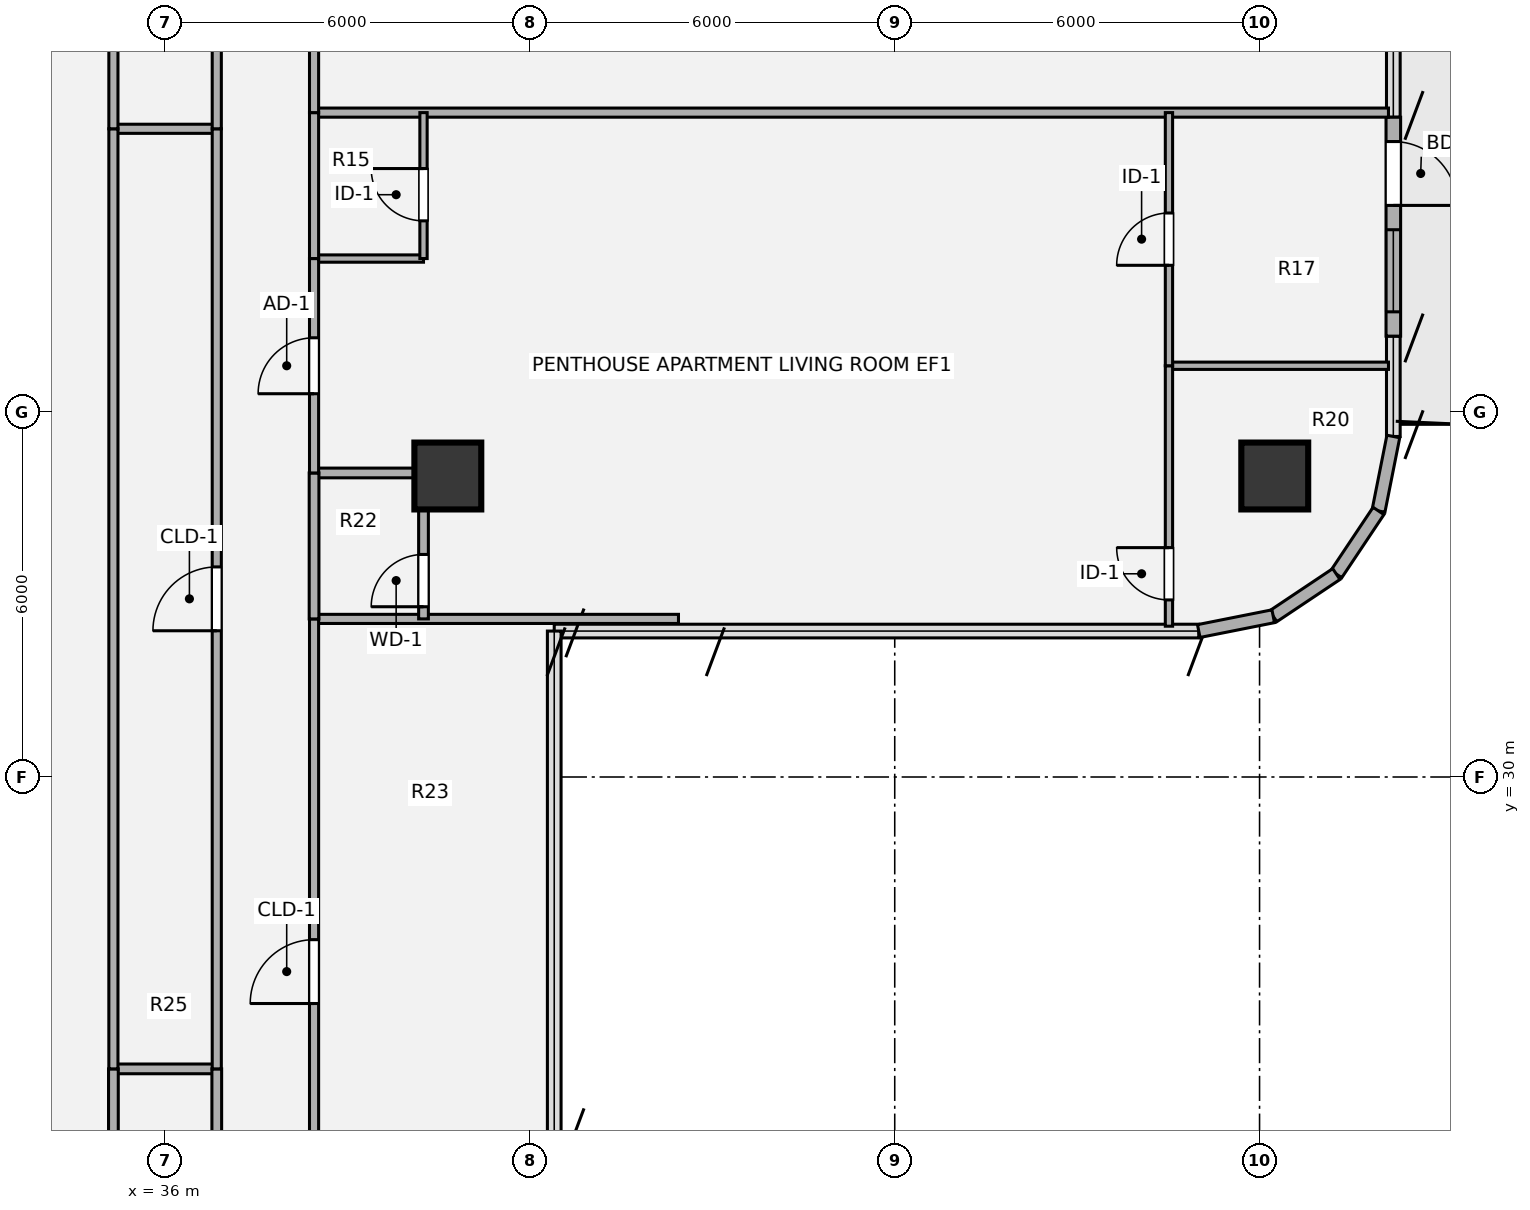
"""IFC4 building model, lengths in metres.
Left out: names, types, materials, properties, quantities, classifications, styles, units other than length and angle.
Written with IfcOpenShell. Run it as: python <this file> out.ifc"""

import sys

from ifc_helpers import new_model, si_unit, direction, frame, frame_2d, origin, origin_2d, place, context, subcontext, project, spatial, rectangle, hollow_circle, extrude, source, transform, mapped, element, fill, save


model = new_model("IFC4")
c1 = context("Model", 3, precision=1e-05, world=origin(), true_north=direction((0.0, 1.0)))
c2 = subcontext(c1, "Body", "Model", "MODEL_VIEW")
j1 = project(units=[si_unit("LENGTHUNIT", "METRE"), si_unit("PLANEANGLEUNIT", "RADIAN")], contexts=[c1])
p1 = place(None, origin())
s1 = spatial("IfcSite", under=j1, at=p1, CompositionType="ELEMENT")
p2 = place(p1, origin())
s2 = spatial("IfcBuilding", under=s1, at=p2, CompositionType="ELEMENT")
p3 = place(p2, frame((0.0, 0.0, 205.56)))
s3 = spatial("IfcBuildingStorey", under=s2, at=p3, CompositionType="ELEMENT", Elevation=205.56)
m1 = source(origin(), c2, "Body", "SweptSolid", [
    extrude(hollow_circle(Radius=0.55, WallThickness=0.04, at=origin_2d()), origin(), (0.0, 0.0, 1.0), 3.78),
])
for number, where, z_axis, x_axis in (
    (1, (54.25, 34.95, 0.0), (0.0, 0.0, 1.0), (1.0, 0.0, 0.0)),
    (2, (40.65, 34.95, 0.0), (0.0, 0.0, 1.0), (1.0, 0.0, 0.0)),
):
    element("IfcColumn", number, at=place(p3, frame(where, z_axis=z_axis, x_axis=x_axis)), inside=s3, PredefinedType="COLUMN", context=c2, shape_type="MappedRepresentation", body=[
        mapped(m1, transform((0.0, 0.0, 0.0), x_axis=(1.0, 0.0, 0.0), y_axis=(0.0, 1.0, 0.0), z_axis=(0.0, 0.0, 1.0), scale=1.0)),
    ])
p4 = place(p3, frame((56.2, 40.85, 0.0), z_axis=(0.0, 0.0, 1.0), x_axis=(0.0, -1.0, 0.0)))
e3 = element("IfcWall", 3, at=p4, inside=s3, PredefinedType="SOLIDWALL", context=c2, shape_type="SweptSolid", body=[
    extrude(rectangle(XDim=3.6, YDim=0.24, at=frame_2d((1.8, 0.0))), origin(), (0.0, 0.0, 1.0), 3.53),
])
p5 = place(p4, frame((0.4, 0.0, 0.0)))
e4 = element("IfcOpeningElement", 4, at=p5, cuts=e3, PredefinedType="OPENING", context=c2, shape_type="SweptSolid", body=[
    extrude(rectangle(XDim=1.05, YDim=2.15, at=origin_2d()), frame((0.525, 0.13, 1.075), z_axis=(0.0, -1.0, 0.0), x_axis=(1.0, 0.0, 0.0)), (0.0, 0.0, 1.0), 0.26),
])
p6 = place(p4, frame((1.85, 0.0, 0.85)))
e5 = element("IfcOpeningElement", 5, at=p6, cuts=e3, PredefinedType="OPENING", context=c2, shape_type="SweptSolid", body=[
    extrude(rectangle(XDim=1.35, YDim=1.35, at=origin_2d()), frame((0.675, 0.13, 0.675), z_axis=(0.0, -1.0, 0.0), x_axis=(1.0, 0.0, 0.0)), (0.0, 0.0, 1.0), 0.26),
])
for number, where, z_axis, x_axis in (
    (6, (56.2, 35.6, 0.0), (0.0, 0.0, 1.0), (-0.195, -0.981, 0.0)),
    (7, (55.956, 34.375, 0.0), (0.0, 0.0, 1.0), (-0.556, -0.831, 0.0)),
    (8, (55.263, 33.337, 0.0), (0.0, 0.0, 1.0), (-0.831, -0.556, 0.0)),
    (9, (54.225, 32.644, 0.0), (0.0, 0.0, 1.0), (-0.981, -0.195, 0.0)),
):
    element("IfcWall", number, at=place(p3, frame(where, z_axis=z_axis, x_axis=x_axis)), inside=s3, PredefinedType="SOLIDWALL", context=c2, shape_type="SweptSolid", body=[
        extrude(rectangle(XDim=1.249, YDim=0.215, at=frame_2d((0.624, 0.0))), origin(), (0.0, 0.0, 1.0), 3.53),
    ])
p7 = place(p3, frame((35.15, 25.2, 0.0), z_axis=(0.0, 0.0, 1.0), x_axis=(1.0, 0.0, 0.0)))
e10 = element("IfcWall", 10, at=p7, inside=s3, PredefinedType="PLUMBINGWALL", context=c2, shape_type="SweptSolid", body=[
    extrude(rectangle(XDim=1.7, YDim=0.16, at=frame_2d((0.85, 0.0))), origin(), (0.0, 0.0, 1.0), 3.5),
])
p8 = place(p3, frame((38.45, 32.6, 0.0), z_axis=(0.0, 0.0, 1.0), x_axis=(1.0, 0.0, 0.0)))
e11 = element("IfcWall", 11, at=p8, inside=s3, PredefinedType="PARTITIONING", context=c2, shape_type="SweptSolid", body=[
    extrude(rectangle(XDim=5.993, YDim=0.15, at=frame_2d((2.997, 0.0))), origin(), (0.0, 0.0, 1.0), 3.5),
])
p9 = place(p3, frame((38.45, 35.0, 0.0), z_axis=(0.0, 0.0, 1.0), x_axis=(1.0, 0.0, 0.0)))
e12 = element("IfcWall", 12, at=p9, inside=s3, PredefinedType="PLUMBINGWALL", context=c2, shape_type="SweptSolid", body=[
    extrude(rectangle(XDim=1.8, YDim=0.16, at=frame_2d((0.9, 0.0))), origin(), (0.0, 0.0, 1.0), 2.903),
])
p10 = place(p3, frame((52.51, 36.763, 0.0), z_axis=(0.0, 0.0, 1.0), x_axis=(1.0, 0.0, 0.0)))
e13 = element("IfcWall", 13, at=p10, inside=s3, PredefinedType="PARTITIONING", context=c2, shape_type="SweptSolid", body=[
    extrude(rectangle(XDim=3.61, YDim=0.12, at=frame_2d((1.805, 0.0))), origin(), (0.0, 0.0, 1.0), 2.982),
])
p11 = place(p3, frame((38.45, 38.526, 0.0), z_axis=(0.0, 0.0, 1.0), x_axis=(1.0, 0.0, 0.0)))
e14 = element("IfcWall", 14, at=p11, inside=s3, PredefinedType="PARTITIONING", context=c2, shape_type="SweptSolid", body=[
    extrude(rectangle(XDim=1.8, YDim=0.12, at=frame_2d((0.9, 0.0))), origin(), (0.0, 0.0, 1.0), 3.259),
])
p12 = place(p3, frame((35.15, 40.66, 0.0), z_axis=(0.0, 0.0, 1.0), x_axis=(1.0, 0.0, 0.0)))
e15 = element("IfcWall", 15, at=p12, inside=s3, PredefinedType="PARTITIONING", context=c2, shape_type="SweptSolid", body=[
    extrude(rectangle(XDim=1.7, YDim=0.15, at=frame_2d((0.85, 0.0))), origin(), (0.0, 0.0, 1.0), 3.259),
])
p13 = place(p3, frame((38.45, 40.926, 0.0), z_axis=(0.0, 0.0, 1.0), x_axis=(1.0, 0.0, 0.0)))
e16 = element("IfcWall", 16, at=p13, inside=s3, PredefinedType="PARTITIONING", context=c2, shape_type="SweptSolid", body=[
    extrude(rectangle(XDim=17.67, YDim=0.15, at=frame_2d((8.835, 0.0))), origin(), (0.0, 0.0, 1.0), 2.982),
])
p14 = place(p3, frame((35.15, 20.2, 0.0), z_axis=(0.0, 0.0, 1.0), x_axis=(0.0, 1.0, 0.0)))
e17 = element("IfcWall", 17, at=p14, inside=s3, PredefinedType="PLUMBINGWALL", context=c2, shape_type="SweptSolid", body=[
    extrude(rectangle(XDim=5.0, YDim=0.16, at=frame_2d((2.5, 0.0))), origin(), (0.0, 0.0, 1.0), 3.5),
])
p15 = place(p14, frame((2.07, 0.0, 0.0)))
e18 = element("IfcOpeningElement", 18, at=p15, cuts=e17, PredefinedType="OPENING", context=c2, shape_type="SweptSolid", body=[
    extrude(rectangle(XDim=0.86, YDim=2.1, at=origin_2d()), frame((0.43, 0.09, 1.05), z_axis=(0.0, -1.0, 0.0), x_axis=(1.0, 0.0, 0.0)), (0.0, 0.0, 1.0), 0.18),
])
p16 = place(p3, frame((35.15, 25.2, 0.0), z_axis=(0.0, 0.0, 1.0), x_axis=(0.0, 1.0, 0.0)))
e19 = element("IfcWall", 19, at=p16, inside=s3, PredefinedType="PARTITIONING", context=c2, shape_type="SweptSolid", body=[
    extrude(rectangle(XDim=15.46, YDim=0.15, at=frame_2d((7.73, 0.0))), origin(), (0.0, 0.0, 1.0), 3.5),
])
p17 = place(p3, frame((35.15, 40.66, 0.0), z_axis=(0.0, 0.0, 1.0), x_axis=(0.0, 1.0, 0.0)))
e20 = element("IfcWall", 20, at=p17, inside=s3, PredefinedType="PARTITIONING", context=c2, shape_type="SweptSolid", body=[
    extrude(rectangle(XDim=10.54, YDim=0.15, at=frame_2d((5.27, 0.0))), origin(), (0.0, 0.0, 1.0), 3.5),
])
p18 = place(p17, frame((4.81, 0.0, 0.0)))
e21 = element("IfcOpeningElement", 21, at=p18, cuts=e20, PredefinedType="OPENING", context=c2, shape_type="SweptSolid", body=[
    extrude(rectangle(XDim=0.86, YDim=2.1, at=origin_2d()), frame((0.43, 0.085, 1.05), z_axis=(0.0, -1.0, 0.0), x_axis=(1.0, 0.0, 0.0)), (0.0, 0.0, 1.0), 0.17),
])
p19 = place(p3, frame((36.85, 20.2, 0.0), z_axis=(0.0, 0.0, 1.0), x_axis=(0.0, 1.0, 0.0)))
e22 = element("IfcWall", 22, at=p19, inside=s3, PredefinedType="PLUMBINGWALL", context=c2, shape_type="SweptSolid", body=[
    extrude(rectangle(XDim=5.0, YDim=0.16, at=frame_2d((2.5, 0.0))), origin(), (0.0, 0.0, 1.0), 3.5),
])
p20 = place(p3, frame((36.85, 25.2, 0.0), z_axis=(0.0, 0.0, 1.0), x_axis=(0.0, 1.0, 0.0)))
e23 = element("IfcWall", 23, at=p20, inside=s3, PredefinedType="PARTITIONING", context=c2, shape_type="SweptSolid", body=[
    extrude(rectangle(XDim=15.46, YDim=0.15, at=frame_2d((7.73, 0.0))), origin(), (0.0, 0.0, 1.0), 3.5),
])
p21 = place(p20, frame((7.205, 0.0, 0.0)))
e24 = element("IfcOpeningElement", 24, at=p21, cuts=e23, PredefinedType="OPENING", context=c2, shape_type="SweptSolid", body=[
    extrude(rectangle(XDim=1.05, YDim=2.1, at=origin_2d()), frame((0.525, 0.085, 1.05), z_axis=(0.0, -1.0, 0.0), x_axis=(1.0, 0.0, 0.0)), (0.0, 0.0, 1.0), 0.17),
])
p22 = place(p3, frame((36.85, 40.66, 0.0), z_axis=(0.0, 0.0, 1.0), x_axis=(0.0, 1.0, 0.0)))
e25 = element("IfcWall", 25, at=p22, inside=s3, PredefinedType="PARTITIONING", context=c2, shape_type="SweptSolid", body=[
    extrude(rectangle(XDim=10.54, YDim=0.15, at=frame_2d((5.27, 0.0))), origin(), (0.0, 0.0, 1.0), 3.5),
])
p23 = place(p3, frame((38.45, 21.2, 0.0), z_axis=(0.0, 0.0, 1.0), x_axis=(0.0, 1.0, 0.0)))
e26 = element("IfcWall", 26, at=p23, inside=s3, PredefinedType="PARTITIONING", context=c2, shape_type="SweptSolid", body=[
    extrude(rectangle(XDim=11.4, YDim=0.15, at=frame_2d((5.7, 0.0))), origin(), (0.0, 0.0, 1.0), 3.5),
])
p24 = place(p23, frame((5.075, 0.0, 0.0)))
e27 = element("IfcOpeningElement", 27, at=p24, cuts=e26, PredefinedType="OPENING", context=c2, shape_type="SweptSolid", body=[
    extrude(rectangle(XDim=1.05, YDim=2.1, at=origin_2d()), frame((0.525, 0.085, 1.05), z_axis=(0.0, -1.0, 0.0), x_axis=(1.0, 0.0, 0.0)), (0.0, 0.0, 1.0), 0.17),
])
p25 = place(p3, frame((38.45, 32.6, 0.0), z_axis=(0.0, 0.0, 1.0), x_axis=(0.0, 1.0, 0.0)))
e28 = element("IfcWall", 28, at=p25, inside=s3, PredefinedType="PLUMBINGWALL", context=c2, shape_type="SweptSolid", body=[
    extrude(rectangle(XDim=2.4, YDim=0.16, at=frame_2d((1.2, 0.0))), origin(), (0.0, 0.0, 1.0), 3.5),
])
p26 = place(p3, frame((38.45, 35.0, 0.0), z_axis=(0.0, 0.0, 1.0), x_axis=(0.0, 1.0, 0.0)))
e29 = element("IfcWall", 29, at=p26, inside=s3, PredefinedType="PARTITIONING", context=c2, shape_type="SweptSolid", body=[
    extrude(rectangle(XDim=3.526, YDim=0.15, at=frame_2d((1.763, 0.0))), origin(), (0.0, 0.0, 1.0), 3.5),
])
p27 = place(p26, frame((1.303, 0.0, 0.0)))
e30 = element("IfcOpeningElement", 30, at=p27, cuts=e29, PredefinedType="OPENING", context=c2, shape_type="SweptSolid", body=[
    extrude(rectangle(XDim=0.92, YDim=2.1, at=origin_2d()), frame((0.46, 0.085, 1.05), z_axis=(0.0, -1.0, 0.0), x_axis=(1.0, 0.0, 0.0)), (0.0, 0.0, 1.0), 0.17),
])
p28 = place(p3, frame((38.45, 38.526, 0.0), z_axis=(0.0, 0.0, 1.0), x_axis=(0.0, 1.0, 0.0)))
e31 = element("IfcWall", 31, at=p28, inside=s3, PredefinedType="PARTITIONING", context=c2, shape_type="SweptSolid", body=[
    extrude(rectangle(XDim=2.4, YDim=0.15, at=frame_2d((1.2, 0.0))), origin(), (0.0, 0.0, 1.0), 3.5),
])
p29 = place(p3, frame((38.45, 40.926, 0.0), z_axis=(0.0, 0.0, 1.0), x_axis=(0.0, 1.0, 0.0)))
e32 = element("IfcWall", 32, at=p29, inside=s3, PredefinedType="PARTITIONING", context=c2, shape_type="SweptSolid", body=[
    extrude(rectangle(XDim=5.068, YDim=0.15, at=frame_2d((2.534, 0.0))), origin(), (0.0, 0.0, 1.0), 3.5),
])
p30 = place(p29, frame((2.009, 0.0, 0.0)))
e33 = element("IfcOpeningElement", 33, at=p30, cuts=e32, PredefinedType="OPENING", context=c2, shape_type="SweptSolid", body=[
    extrude(rectangle(XDim=1.05, YDim=2.1, at=origin_2d()), frame((0.525, 0.085, 1.05), z_axis=(0.0, -1.0, 0.0), x_axis=(1.0, 0.0, 0.0)), (0.0, 0.0, 1.0), 0.17),
])
p31 = place(p3, frame((40.25, 32.6, 0.0), z_axis=(0.0, 0.0, 1.0), x_axis=(0.0, 1.0, 0.0)))
e34 = element("IfcWall", 34, at=p31, inside=s3, PredefinedType="PLUMBINGWALL", context=c2, shape_type="SweptSolid", body=[
    extrude(rectangle(XDim=2.4, YDim=0.16, at=frame_2d((1.2, 0.0))), origin(), (0.0, 0.0, 1.0), 3.5),
])
p32 = place(p31, frame((0.2, 0.0, 0.0)))
e35 = element("IfcOpeningElement", 35, at=p32, cuts=e34, PredefinedType="OPENING", context=c2, shape_type="SweptSolid", body=[
    extrude(rectangle(XDim=0.86, YDim=2.1, at=origin_2d()), frame((0.43, 0.09, 1.05), z_axis=(0.0, -1.0, 0.0), x_axis=(1.0, 0.0, 0.0)), (0.0, 0.0, 1.0), 0.18),
])
p33 = place(p3, frame((40.25, 38.526, 0.0), z_axis=(0.0, 0.0, 1.0), x_axis=(0.0, 1.0, 0.0)))
e36 = element("IfcWall", 36, at=p33, inside=s3, PredefinedType="PARTITIONING", context=c2, shape_type="SweptSolid", body=[
    extrude(rectangle(XDim=2.4, YDim=0.12, at=frame_2d((1.2, 0.0))), origin(), (0.0, 0.0, 1.0), 3.5),
])
p34 = place(p33, frame((0.62, 0.0, 0.0)))
e37 = element("IfcOpeningElement", 37, at=p34, cuts=e36, PredefinedType="OPENING", context=c2, shape_type="SweptSolid", body=[
    extrude(rectangle(XDim=0.86, YDim=2.1, at=origin_2d()), frame((0.43, 0.07, 1.05), z_axis=(0.0, -1.0, 0.0), x_axis=(1.0, 0.0, 0.0)), (0.0, 0.0, 1.0), 0.14),
])
p35 = place(p3, frame((52.51, 32.48, 0.0), z_axis=(0.0, 0.0, 1.0), x_axis=(0.0, 1.0, 0.0)))
e38 = element("IfcWall", 38, at=p35, inside=s3, PredefinedType="PARTITIONING", context=c2, shape_type="SweptSolid", body=[
    extrude(rectangle(XDim=4.283, YDim=0.12, at=frame_2d((2.142, 0.0))), origin(), (0.0, 0.0, 1.0), 3.5),
])
p36 = place(p35, frame((0.432, 0.0, 0.0)))
e39 = element("IfcOpeningElement", 39, at=p36, cuts=e38, PredefinedType="OPENING", context=c2, shape_type="SweptSolid", body=[
    extrude(rectangle(XDim=0.86, YDim=2.1, at=origin_2d()), frame((0.43, 0.07, 1.05), z_axis=(0.0, -1.0, 0.0), x_axis=(1.0, 0.0, 0.0)), (0.0, 0.0, 1.0), 0.14),
])
p37 = place(p3, frame((52.51, 36.763, 0.0), z_axis=(0.0, 0.0, 1.0), x_axis=(0.0, 1.0, 0.0)))
e40 = element("IfcWall", 40, at=p37, inside=s3, PredefinedType="PARTITIONING", context=c2, shape_type="SweptSolid", body=[
    extrude(rectangle(XDim=4.163, YDim=0.12, at=frame_2d((2.082, 0.0))), origin(), (0.0, 0.0, 1.0), 3.5),
])
p38 = place(p37, frame((1.652, 0.0, 0.0)))
e41 = element("IfcOpeningElement", 41, at=p38, cuts=e40, PredefinedType="OPENING", context=c2, shape_type="SweptSolid", body=[
    extrude(rectangle(XDim=0.86, YDim=2.1, at=origin_2d()), frame((0.43, 0.07, 1.05), z_axis=(0.0, -1.0, 0.0), x_axis=(1.0, 0.0, 0.0)), (0.0, 0.0, 1.0), 0.14),
])
m2 = source(origin(), c2, "Body", "SweptSolid", [
    extrude(rectangle(XDim=1.05, YDim=2.15, at=origin_2d()), frame((0.525, 0.025, 1.075), z_axis=(0.0, -1.0, 0.0), x_axis=(1.0, 0.0, 0.0)), (0.0, 0.0, 1.0), 0.05),
])
p39 = place(p5, origin())
e42 = element("IfcDoor", 42, at=p39, inside=s3, OperationType="SINGLE_SWING_RIGHT", PredefinedType="DOOR", context=c2, shape_type="MappedRepresentation", body=[
    mapped(m2, transform((0.0, 0.0, 0.0), x_axis=(1.0, 0.0, 0.0), y_axis=(0.0, 1.0, 0.0), z_axis=(0.0, 0.0, 1.0), scale=1.0)),
])
fill(e4, e42)
m3 = source(origin(), c2, "Body", "SweptSolid", [
    extrude(rectangle(XDim=1.35, YDim=1.35, at=origin_2d()), frame((0.675, 0.03, 0.675), z_axis=(0.0, -1.0, 0.0), x_axis=(1.0, 0.0, 0.0)), (0.0, 0.0, 1.0), 0.06),
])
p40 = place(p6, origin())
e43 = element("IfcWindow", 43, at=p40, inside=s3, PartitioningType="SINGLE_PANEL", PredefinedType="WINDOW", context=c2, shape_type="MappedRepresentation", body=[
    mapped(m3, transform((0.0, 0.0, 0.0), x_axis=(1.0, 0.0, 0.0), y_axis=(0.0, 1.0, 0.0), z_axis=(0.0, 0.0, 1.0), scale=1.0)),
])
fill(e5, e43)
m4 = source(origin(), c2, "Body", "SweptSolid", [
    extrude(rectangle(XDim=1.05, YDim=2.1, at=origin_2d()), frame((0.525, 0.025, 1.05), z_axis=(0.0, -1.0, 0.0), x_axis=(1.0, 0.0, 0.0)), (0.0, 0.0, 1.0), 0.05),
])
p41 = place(p21, origin())
e44 = element("IfcDoor", 44, at=p41, inside=s3, OperationType="SINGLE_SWING_LEFT", PredefinedType="DOOR", context=c2, shape_type="MappedRepresentation", body=[
    mapped(m4, transform((0.0, 0.0, 0.0), x_axis=(1.0, 0.0, 0.0), y_axis=(0.0, 1.0, 0.0), z_axis=(0.0, 0.0, 1.0), scale=1.0)),
])
fill(e24, e44)
p42 = place(p24, origin())
e45 = element("IfcDoor", 45, at=p42, inside=s3, OperationType="SINGLE_SWING_LEFT", PredefinedType="DOOR", context=c2, shape_type="MappedRepresentation", body=[
    mapped(m4, transform((0.0, 0.0, 0.0), x_axis=(1.0, 0.0, 0.0), y_axis=(0.0, 1.0, 0.0), z_axis=(0.0, 0.0, 1.0), scale=1.0)),
])
fill(e27, e45)
m5 = source(origin(), c2, "Body", "SweptSolid", [
    extrude(rectangle(XDim=0.92, YDim=2.1, at=origin_2d()), frame((0.46, 0.025, 1.05), z_axis=(0.0, -1.0, 0.0), x_axis=(1.0, 0.0, 0.0)), (0.0, 0.0, 1.0), 0.05),
])
p43 = place(p27, origin())
e46 = element("IfcDoor", 46, at=p43, inside=s3, OperationType="SINGLE_SWING_LEFT", PredefinedType="DOOR", context=c2, shape_type="MappedRepresentation", body=[
    mapped(m5, transform((0.0, 0.0, 0.0), x_axis=(1.0, 0.0, 0.0), y_axis=(0.0, 1.0, 0.0), z_axis=(0.0, 0.0, 1.0), scale=1.0)),
])
fill(e30, e46)
m6 = source(origin(), c2, "Body", "SweptSolid", [
    extrude(rectangle(XDim=0.86, YDim=2.1, at=origin_2d()), frame((0.43, 0.025, 1.05), z_axis=(0.0, -1.0, 0.0), x_axis=(1.0, 0.0, 0.0)), (0.0, 0.0, 1.0), 0.05),
])
p44 = place(p32, origin())
e47 = element("IfcDoor", 47, at=p44, inside=s3, OperationType="SINGLE_SWING_LEFT", PredefinedType="DOOR", context=c2, shape_type="MappedRepresentation", body=[
    mapped(m6, transform((0.0, 0.0, 0.0), x_axis=(1.0, 0.0, 0.0), y_axis=(0.0, 1.0, 0.0), z_axis=(0.0, 0.0, 1.0), scale=1.0)),
])
fill(e35, e47)
m7 = source(origin(), c2, "Body", "SweptSolid", [
    extrude(rectangle(XDim=0.86, YDim=2.1, at=origin_2d()), frame((0.43, 0.025, 1.05), z_axis=(0.0, -1.0, 0.0), x_axis=(1.0, 0.0, 0.0)), (0.0, 0.0, 1.0), 0.05),
])
p45 = place(p34, origin())
e48 = element("IfcDoor", 48, at=p45, inside=s3, OperationType="SINGLE_SWING_RIGHT", PredefinedType="DOOR", context=c2, shape_type="MappedRepresentation", body=[
    mapped(m7, transform((0.0, 0.0, 0.0), x_axis=(1.0, 0.0, 0.0), y_axis=(0.0, 1.0, 0.0), z_axis=(0.0, 0.0, 1.0), scale=1.0)),
])
fill(e37, e48)
p46 = place(p36, origin())
e49 = element("IfcDoor", 49, at=p46, inside=s3, OperationType="SINGLE_SWING_RIGHT", PredefinedType="DOOR", context=c2, shape_type="MappedRepresentation", body=[
    mapped(m7, transform((0.0, 0.0, 0.0), x_axis=(1.0, 0.0, 0.0), y_axis=(0.0, 1.0, 0.0), z_axis=(0.0, 0.0, 1.0), scale=1.0)),
])
fill(e39, e49)
p47 = place(p38, origin())
e50 = element("IfcDoor", 50, at=p47, inside=s3, OperationType="SINGLE_SWING_LEFT", PredefinedType="DOOR", context=c2, shape_type="MappedRepresentation", body=[
    mapped(m7, transform((0.0, 0.0, 0.0), x_axis=(1.0, 0.0, 0.0), y_axis=(0.0, 1.0, 0.0), z_axis=(0.0, 0.0, 1.0), scale=1.0)),
])
fill(e41, e50)
save(model, sys.argv[1])
